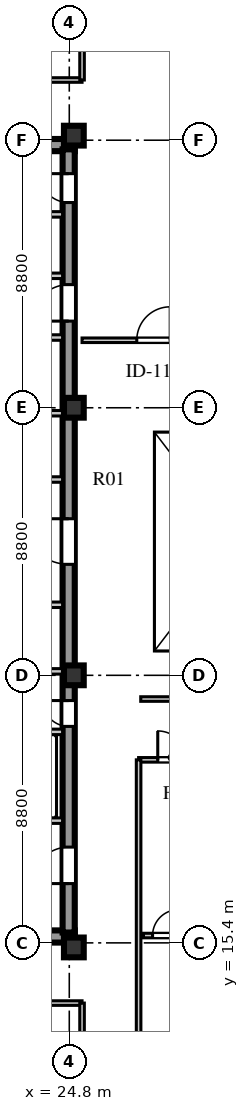
"""IFC4 building model, lengths in metres.
Left out: names, types, materials, properties, quantities, classifications, styles, units other than length and angle.
Written with IfcOpenShell. Run it as: python <this file> out.ifc"""

import sys

from ifc_helpers import new_model, si_unit, direction, frame, frame_2d, origin, origin_2d, place, context, subcontext, project, spatial, rectangle, extrude, element, fill, save


model = new_model("IFC4")
c1 = context("Model", 3, precision=1e-05, world=origin(), true_north=direction((0.0, 1.0)))
c2 = subcontext(c1, "Body", "Model", "MODEL_VIEW")
j1 = project(units=[si_unit("LENGTHUNIT", "METRE"), si_unit("PLANEANGLEUNIT", "RADIAN")], contexts=[c1])
p1 = place(None, origin())
s1 = spatial("IfcSite", under=j1, at=p1, CompositionType="ELEMENT")
p2 = place(p1, origin())
s2 = spatial("IfcBuilding", under=s1, at=p2, CompositionType="ELEMENT")
p3 = place(p2, frame((0.0, 0.0, 312.5)))
s3 = spatial("IfcBuildingStorey", under=s2, at=p3, CompositionType="ELEMENT", Elevation=312.5)
for number, where, z_axis, x_axis in (
    (1, (15.5, 15.61, 0.0), (0.0, 0.0, 1.0), (1.0, 0.0, 0.0)),
    (2, (15.5, 41.64, 0.0), (0.0, 0.0, 1.0), (1.0, 0.0, 0.0)),
):
    element("IfcWall", number, at=place(p3, frame(where, z_axis=z_axis, x_axis=x_axis)), inside=s3, PredefinedType="SHEAR", context=c2, shape_type="SweptSolid", body=[
        extrude(rectangle(XDim=9.48, YDim=0.4, at=frame_2d((4.74, 0.0))), origin(), (0.0, 0.0, 1.0), 3.56),
    ])
p4 = place(p3, frame((24.78, 15.74, 0.0), z_axis=(0.0, 0.0, 1.0), x_axis=(0.0, 1.0, 0.0)))
e3 = element("IfcWall", 3, at=p4, inside=s3, PredefinedType="SHEAR", context=c2, shape_type="SweptSolid", body=[
    extrude(rectangle(XDim=25.76, YDim=0.4, at=frame_2d((12.88, 0.0))), origin(), (0.0, 0.0, 1.0), 3.56),
])
p5 = place(p4, frame((1.61, 0.0, 0.0)))
e4 = element("IfcOpeningElement", 4, at=p5, cuts=e3, PredefinedType="OPENING", context=c2, shape_type="SweptSolid", body=[
    extrude(rectangle(XDim=1.2, YDim=2.1, at=frame_2d((0.6, 1.05))), frame((0.0, 0.21, 0.0), z_axis=(0.0, -1.0, 0.0), x_axis=(1.0, 0.0, 0.0)), (0.0, 0.0, 1.0), 0.42),
])
p6 = place(p4, frame((6.78, 0.0, 0.0)))
e5 = element("IfcOpeningElement", 5, at=p6, cuts=e3, PredefinedType="OPENING", context=c2, shape_type="SweptSolid", body=[
    extrude(rectangle(XDim=0.85, YDim=2.06, at=frame_2d((0.425, 1.03))), frame((0.0, 0.21, 0.0), z_axis=(0.0, -1.0, 0.0), x_axis=(1.0, 0.0, 0.0)), (0.0, 0.0, 1.0), 0.42),
])
p7 = place(p4, frame((12.11, 0.0, 0.0)))
e6 = element("IfcOpeningElement", 6, at=p7, cuts=e3, PredefinedType="OPENING", context=c2, shape_type="SweptSolid", body=[
    extrude(rectangle(XDim=1.5, YDim=2.12, at=frame_2d((0.75, 1.06))), frame((0.0, 0.21, 0.0), z_axis=(0.0, -1.0, 0.0), x_axis=(1.0, 0.0, 0.0)), (0.0, 0.0, 1.0), 0.42),
])
p8 = place(p4, frame((20.11, 0.0, 0.0)))
e7 = element("IfcOpeningElement", 7, at=p8, cuts=e3, PredefinedType="OPENING", context=c2, shape_type="SweptSolid", body=[
    extrude(rectangle(XDim=1.2, YDim=2.12, at=frame_2d((0.6, 1.06))), frame((0.0, 0.21, 0.0), z_axis=(0.0, -1.0, 0.0), x_axis=(1.0, 0.0, 0.0)), (0.0, 0.0, 1.0), 0.42),
])
p9 = place(p4, frame((24.01, 0.0, 0.0)))
e8 = element("IfcOpeningElement", 8, at=p9, cuts=e3, PredefinedType="OPENING", context=c2, shape_type="SweptSolid", body=[
    extrude(rectangle(XDim=0.95, YDim=2.1, at=frame_2d((0.475, 1.05))), frame((0.0, 0.21, 0.0), z_axis=(0.0, -1.0, 0.0), x_axis=(1.0, 0.0, 0.0)), (0.0, 0.0, 1.0), 0.42),
])
for number, where, z_axis, x_axis in (
    (9, (24.95, 15.25, 0.0), (0.0, 0.0, 1.0), (1.0, 0.0, 0.0)),
    (10, (24.95, 24.2, 0.0), (0.0, 0.0, 1.0), (1.0, 0.0, 0.0)),
    (11, (24.95, 33.0, 0.0), (0.0, 0.0, 1.0), (1.0, 0.0, 0.0)),
    (12, (24.95, 41.95, 0.0), (0.0, 0.0, 1.0), (1.0, 0.0, 0.0)),
):
    element("IfcColumn", number, at=place(p3, frame(where, z_axis=z_axis, x_axis=x_axis)), inside=s3, PredefinedType="COLUMN", context=c2, shape_type="SweptSolid", body=[
        extrude(rectangle(XDim=0.65, YDim=0.65, at=origin_2d()), origin(), (0.0, 0.0, 1.0), 3.56),
    ])
p10 = place(p3, frame((19.64, 19.42, 0.0), z_axis=(0.0, 0.0, 1.0), x_axis=(1.0, 0.0, 0.0)))
e13 = element("IfcWall", 13, at=p10, inside=s3, PredefinedType="SOLIDWALL", context=c2, shape_type="SweptSolid", body=[
    extrude(rectangle(XDim=4.94, YDim=0.18, at=frame_2d((2.47, 0.0))), origin(), (0.0, 0.0, 1.0), 3.56),
])
p11 = place(p10, frame((0.72, 0.0, 0.0)))
e14 = element("IfcOpeningElement", 14, at=p11, cuts=e13, PredefinedType="OPENING", context=c2, shape_type="SweptSolid", body=[
    extrude(rectangle(XDim=1.1, YDim=2.1, at=frame_2d((0.55, 1.05))), frame((0.0, 0.1, 0.0), z_axis=(0.0, -1.0, 0.0), x_axis=(1.0, 0.0, 0.0)), (0.0, 0.0, 1.0), 0.2),
])
p12 = place(p10, frame((3.02, 0.0, 0.0)))
e15 = element("IfcOpeningElement", 15, at=p12, cuts=e13, PredefinedType="OPENING", context=c2, shape_type="SweptSolid", body=[
    extrude(rectangle(XDim=1.1, YDim=2.1, at=frame_2d((0.55, 1.05))), frame((0.0, 0.1, 0.0), z_axis=(0.0, -1.0, 0.0), x_axis=(1.0, 0.0, 0.0)), (0.0, 0.0, 1.0), 0.2),
])
p13 = place(p3, frame((19.64, 22.34, 0.0), z_axis=(0.0, 0.0, 1.0), x_axis=(1.0, 0.0, 0.0)))
e16 = element("IfcWall", 16, at=p13, inside=s3, PredefinedType="SOLIDWALL", context=c2, shape_type="SweptSolid", body=[
    extrude(rectangle(XDim=4.94, YDim=0.18, at=frame_2d((2.47, 0.0))), origin(), (0.0, 0.0, 1.0), 3.56),
])
p14 = place(p3, frame((15.9, 26.52, 0.0), z_axis=(0.0, 0.0, 1.0), x_axis=(1.0, 0.0, 0.0)))
e17 = element("IfcWall", 17, at=p14, inside=s3, PredefinedType="SOLIDWALL", context=c2, shape_type="SweptSolid", body=[
    extrude(rectangle(XDim=8.68, YDim=0.18, at=frame_2d((4.34, 0.0))), origin(), (0.0, 0.0, 1.0), 3.56),
])
p15 = place(p14, frame((2.05, 0.0, 0.0)))
e18 = element("IfcOpeningElement", 18, at=p15, cuts=e17, PredefinedType="OPENING", context=c2, shape_type="SweptSolid", body=[
    extrude(rectangle(XDim=0.85, YDim=2.06, at=frame_2d((0.425, 1.03))), frame((0.0, 0.1, 0.0), z_axis=(0.0, -1.0, 0.0), x_axis=(1.0, 0.0, 0.0)), (0.0, 0.0, 1.0), 0.2),
])
p16 = place(p14, frame((5.2, 0.0, 0.0)))
e19 = element("IfcOpeningElement", 19, at=p16, cuts=e17, PredefinedType="OPENING", context=c2, shape_type="SweptSolid", body=[
    extrude(rectangle(XDim=0.95, YDim=2.1, at=frame_2d((0.475, 1.05))), frame((0.0, 0.1, 0.0), z_axis=(0.0, -1.0, 0.0), x_axis=(1.0, 0.0, 0.0)), (0.0, 0.0, 1.0), 0.2),
])
p17 = place(p3, frame((15.9, 24.33, 0.0), z_axis=(0.0, 0.0, 1.0), x_axis=(1.0, 0.0, 0.0)))
e20 = element("IfcWall", 20, at=p17, inside=s3, PredefinedType="SOLIDWALL", context=c2, shape_type="SweptSolid", body=[
    extrude(rectangle(XDim=8.68, YDim=0.18, at=frame_2d((4.34, 0.0))), origin(), (0.0, 0.0, 1.0), 2.96),
])
p18 = place(p3, frame((15.9, 30.64, 0.0), z_axis=(0.0, 0.0, 1.0), x_axis=(1.0, 0.0, 0.0)))
e21 = element("IfcWall", 21, at=p18, inside=s3, PredefinedType="SOLIDWALL", context=c2, shape_type="SweptSolid", body=[
    extrude(rectangle(XDim=8.68, YDim=0.18, at=frame_2d((4.34, 0.0))), origin(), (0.0, 0.0, 1.0), 3.56),
])
p19 = place(p18, frame((3.7, 0.0, 0.0)))
e22 = element("IfcOpeningElement", 22, at=p19, cuts=e21, PredefinedType="OPENING", context=c2, shape_type="SweptSolid", body=[
    extrude(rectangle(XDim=0.95, YDim=2.1, at=frame_2d((0.475, 1.05))), frame((0.0, 0.1, 0.0), z_axis=(0.0, -1.0, 0.0), x_axis=(1.0, 0.0, 0.0)), (0.0, 0.0, 1.0), 0.2),
])
p20 = place(p3, frame((15.9, 32.82, 0.0), z_axis=(0.0, 0.0, 1.0), x_axis=(1.0, 0.0, 0.0)))
e23 = element("IfcWall", 23, at=p20, inside=s3, PredefinedType="SOLIDWALL", context=c2, shape_type="SweptSolid", body=[
    extrude(rectangle(XDim=8.68, YDim=0.18, at=frame_2d((4.34, 0.0))), origin(), (0.0, 0.0, 1.0), 2.96),
])
p21 = place(p3, frame((22.02, 35.31, 0.0), z_axis=(0.0, 0.0, 1.0), x_axis=(1.0, 0.0, 0.0)))
e24 = element("IfcWall", 24, at=p21, inside=s3, PredefinedType="SOLIDWALL", context=c2, shape_type="SweptSolid", body=[
    extrude(rectangle(XDim=2.56, YDim=0.18, at=frame_2d((1.28, 0.0))), origin(), (0.0, 0.0, 1.0), 3.56),
])
p22 = place(p21, frame((0.55, 0.0, 0.0)))
e25 = element("IfcOpeningElement", 25, at=p22, cuts=e24, PredefinedType="OPENING", context=c2, shape_type="SweptSolid", body=[
    extrude(rectangle(XDim=1.0, YDim=2.1, at=frame_2d((0.5, 1.05))), frame((0.0, 0.1, 0.0), z_axis=(0.0, -1.0, 0.0), x_axis=(1.0, 0.0, 0.0)), (0.0, 0.0, 1.0), 0.2),
])
p23 = place(p3, frame((19.64, 37.34, 0.0), z_axis=(0.0, 0.0, 1.0), x_axis=(1.0, 0.0, 0.0)))
e26 = element("IfcWall", 26, at=p23, inside=s3, PredefinedType="SOLIDWALL", context=c2, shape_type="SweptSolid", body=[
    extrude(rectangle(XDim=4.94, YDim=0.18, at=frame_2d((2.47, 0.0))), origin(), (0.0, 0.0, 1.0), 3.56),
])
p24 = place(p23, frame((0.45, 0.0, 0.0)))
e27 = element("IfcOpeningElement", 27, at=p24, cuts=e26, PredefinedType="OPENING", context=c2, shape_type="SweptSolid", body=[
    extrude(rectangle(XDim=1.0, YDim=2.1, at=frame_2d((0.5, 1.05))), frame((0.0, 0.1, 0.0), z_axis=(0.0, -1.0, 0.0), x_axis=(1.0, 0.0, 0.0)), (0.0, 0.0, 1.0), 0.2),
])
p25 = place(p23, frame((2.5, 0.0, 0.0)))
e28 = element("IfcOpeningElement", 28, at=p25, cuts=e26, PredefinedType="OPENING", context=c2, shape_type="SweptSolid", body=[
    extrude(rectangle(XDim=1.0, YDim=2.1, at=frame_2d((0.5, 1.05))), frame((0.0, 0.1, 0.0), z_axis=(0.0, -1.0, 0.0), x_axis=(1.0, 0.0, 0.0)), (0.0, 0.0, 1.0), 0.2),
])
p26 = place(p3, frame((19.64, 39.36, 0.0), z_axis=(0.0, 0.0, 1.0), x_axis=(1.0, 0.0, 0.0)))
e29 = element("IfcWall", 29, at=p26, inside=s3, PredefinedType="SOLIDWALL", context=c2, shape_type="SweptSolid", body=[
    extrude(rectangle(XDim=4.94, YDim=0.18, at=frame_2d((2.47, 0.0))), origin(), (0.0, 0.0, 1.0), 3.56),
])
p27 = place(p3, frame((27.08, 21.42, 0.0), z_axis=(0.0, 0.0, 1.0), x_axis=(1.0, 0.0, 0.0)))
e30 = element("IfcWall", 30, at=p27, inside=s3, PredefinedType="PARTITIONING", context=c2, shape_type="SweptSolid", body=[
    extrude(rectangle(XDim=12.07, YDim=0.15, at=frame_2d((6.035, 0.0))), origin(), (0.0, 0.0, 1.0), 3.26),
])
p28 = place(p27, frame((0.63, 0.0, 0.0)))
e31 = element("IfcOpeningElement", 31, at=p28, cuts=e30, PredefinedType="OPENING", context=c2, shape_type="SweptSolid", body=[
    extrude(rectangle(XDim=0.95, YDim=2.1, at=frame_2d((0.475, 1.05))), frame((0.0, 0.085, 0.0), z_axis=(0.0, -1.0, 0.0), x_axis=(1.0, 0.0, 0.0)), (0.0, 0.0, 1.0), 0.17),
])
p29 = place(p3, frame((27.08, 10.38, 0.0), z_axis=(0.0, 0.0, 1.0), x_axis=(0.0, 1.0, 0.0)))
e32 = element("IfcWall", 32, at=p29, inside=s3, PredefinedType="PARTITIONING", context=c2, shape_type="SweptSolid", body=[
    extrude(rectangle(XDim=11.04, YDim=0.15, at=frame_2d((5.52, 0.0))), origin(), (0.0, 0.0, 1.0), 3.56),
])
p30 = place(p3, frame((27.15, 23.42, 0.0), z_axis=(0.0, 0.0, 1.0), x_axis=(1.0, 0.0, 0.0)))
e33 = element("IfcWall", 33, at=p30, inside=s3, PredefinedType="PARTITIONING", context=c2, shape_type="SweptSolid", body=[
    extrude(rectangle(XDim=6.0, YDim=0.15, at=frame_2d((3.0, 0.0))), origin(), (0.0, 0.0, 1.0), 3.56),
])
p31 = place(p3, frame((25.22, 35.22, 0.0), z_axis=(0.0, 0.0, 1.0), x_axis=(1.0, 0.0, 0.0)))
e34 = element("IfcWall", 34, at=p31, inside=s3, PredefinedType="PARTITIONING", context=c2, shape_type="SweptSolid", body=[
    extrude(rectangle(XDim=9.5, YDim=0.15, at=frame_2d((4.75, 0.0))), origin(), (0.0, 0.0, 1.0), 3.56),
])
p32 = place(p31, frame((1.8, 0.0, 0.0)))
e35 = element("IfcOpeningElement", 35, at=p32, cuts=e34, PredefinedType="OPENING", context=c2, shape_type="SweptSolid", body=[
    extrude(rectangle(XDim=1.1, YDim=2.08, at=frame_2d((0.55, 1.04))), frame((0.0, 0.085, 0.0), z_axis=(0.0, -1.0, 0.0), x_axis=(1.0, 0.0, 0.0)), (0.0, 0.0, 1.0), 0.17),
])
p33 = place(p3, frame((13.8, 13.42, 0.0), z_axis=(0.0, 0.0, 1.0), x_axis=(1.0, 0.0, 0.0)))
e36 = element("IfcWall", 36, at=p33, inside=s3, PredefinedType="PARTITIONING", context=c2, shape_type="SweptSolid", body=[
    extrude(rectangle(XDim=11.42, YDim=0.15, at=frame_2d((5.71, 0.0))), origin(), (0.0, 0.0, 1.0), 3.56),
])
p34 = place(p33, frame((3.2, 0.0, 0.0)))
e37 = element("IfcOpeningElement", 37, at=p34, cuts=e36, PredefinedType="OPENING", context=c2, shape_type="SweptSolid", body=[
    extrude(rectangle(XDim=0.95, YDim=2.08, at=frame_2d((0.475, 1.04))), frame((0.0, 0.085, 0.0), z_axis=(0.0, -1.0, 0.0), x_axis=(1.0, 0.0, 0.0)), (0.0, 0.0, 1.0), 0.17),
])
p35 = place(p3, frame((25.22, 10.38, 0.0), z_axis=(0.0, 0.0, 1.0), x_axis=(0.0, 1.0, 0.0)))
e38 = element("IfcWall", 38, at=p35, inside=s3, PredefinedType="PARTITIONING", context=c2, shape_type="SweptSolid", body=[
    extrude(rectangle(XDim=3.04, YDim=0.15, at=frame_2d((1.52, 0.0))), origin(), (0.0, 0.0, 1.0), 3.11),
])
p36 = place(p3, frame((13.8, 43.78, 0.0), z_axis=(0.0, 0.0, 1.0), x_axis=(1.0, 0.0, 0.0)))
e39 = element("IfcWall", 39, at=p36, inside=s3, PredefinedType="PARTITIONING", context=c2, shape_type="SweptSolid", body=[
    extrude(rectangle(XDim=11.42, YDim=0.15, at=frame_2d((5.71, 0.0))), origin(), (0.0, 0.0, 1.0), 3.56),
])
p37 = place(p36, frame((3.2, 0.0, 0.0)))
e40 = element("IfcOpeningElement", 40, at=p37, cuts=e39, PredefinedType="OPENING", context=c2, shape_type="SweptSolid", body=[
    extrude(rectangle(XDim=0.95, YDim=2.08, at=frame_2d((0.475, 1.04))), frame((0.0, 0.085, 0.0), z_axis=(0.0, -1.0, 0.0), x_axis=(1.0, 0.0, 0.0)), (0.0, 0.0, 1.0), 0.17),
])
p38 = place(p3, frame((25.22, 43.78, 0.0), z_axis=(0.0, 0.0, 1.0), x_axis=(0.0, 1.0, 0.0)))
e41 = element("IfcWall", 41, at=p38, inside=s3, PredefinedType="PARTITIONING", context=c2, shape_type="SweptSolid", body=[
    extrude(rectangle(XDim=3.04, YDim=0.15, at=frame_2d((1.52, 0.0))), origin(), (0.0, 0.0, 1.0), 3.11),
])
p39 = place(p3, frame((27.24, 15.641, 0.0), z_axis=(0.0, 0.0, 1.0), x_axis=(1.0, 0.0, 0.0)))
e42 = element("IfcWall", 42, at=p39, inside=s3, PredefinedType="PARTITIONING", context=c2, shape_type="SweptSolid", body=[
    extrude(rectangle(XDim=11.83, YDim=0.15, at=frame_2d((5.915, 0.0))), origin(), (0.0, 0.0, 1.0), 3.56),
])
p40 = place(p39, frame((0.3, 0.0, 0.0)))
e43 = element("IfcOpeningElement", 43, at=p40, cuts=e42, PredefinedType="OPENING", context=c2, shape_type="SweptSolid", body=[
    extrude(rectangle(XDim=0.85, YDim=2.08, at=frame_2d((0.425, 1.04))), frame((0.0, 0.085, 0.0), z_axis=(0.0, -1.0, 0.0), x_axis=(1.0, 0.0, 0.0)), (0.0, 0.0, 1.0), 0.17),
])
p41 = place(p39, frame((4.475, 0.0, 0.0)))
e44 = element("IfcOpeningElement", 44, at=p41, cuts=e42, PredefinedType="OPENING", context=c2, shape_type="SweptSolid", body=[
    extrude(rectangle(XDim=0.85, YDim=2.08, at=frame_2d((0.425, 1.04))), frame((0.0, 0.085, 0.0), z_axis=(0.0, -1.0, 0.0), x_axis=(1.0, 0.0, 0.0)), (0.0, 0.0, 1.0), 0.17),
])
p42 = place(p5, frame((1.2, 0.0, 0.0), z_axis=(0.0, 0.0, 1.0), x_axis=(-1.0, 0.0, 0.0)))
e45 = element("IfcDoor", 45, at=p42, inside=s3, OperationType="SINGLE_SWING_RIGHT", PredefinedType="DOOR", context=c2, shape_type="SweptSolid", body=[
    extrude(rectangle(XDim=1.2, YDim=2.1, at=frame_2d((0.6, 1.05))), frame((0.0, 0.025, 0.0), z_axis=(0.0, -1.0, 0.0), x_axis=(1.0, 0.0, 0.0)), (0.0, 0.0, 1.0), 0.05),
])
fill(e4, e45)
p43 = place(p6, frame((0.85, 0.0, 0.0), z_axis=(0.0, 0.0, 1.0), x_axis=(-1.0, 0.0, 0.0)))
e46 = element("IfcDoor", 46, at=p43, inside=s3, OperationType="SINGLE_SWING_LEFT", PredefinedType="DOOR", context=c2, shape_type="SweptSolid", body=[
    extrude(rectangle(XDim=0.85, YDim=2.06, at=frame_2d((0.425, 1.03))), frame((0.0, 0.025, 0.0), z_axis=(0.0, -1.0, 0.0), x_axis=(1.0, 0.0, 0.0)), (0.0, 0.0, 1.0), 0.05),
])
fill(e5, e46)
p44 = place(p7, frame((1.5, 0.0, 0.0), z_axis=(0.0, 0.0, 1.0), x_axis=(-1.0, 0.0, 0.0)))
e47 = element("IfcDoor", 47, at=p44, inside=s3, OperationType="SINGLE_SWING_LEFT", PredefinedType="DOOR", context=c2, shape_type="SweptSolid", body=[
    extrude(rectangle(XDim=1.5, YDim=2.12, at=frame_2d((0.75, 1.06))), frame((0.0, 0.025, 0.0), z_axis=(0.0, -1.0, 0.0), x_axis=(1.0, 0.0, 0.0)), (0.0, 0.0, 1.0), 0.05),
])
fill(e6, e47)
p45 = place(p8, frame((1.2, 0.0, 0.0), z_axis=(0.0, 0.0, 1.0), x_axis=(-1.0, 0.0, 0.0)))
e48 = element("IfcDoor", 48, at=p45, inside=s3, OperationType="SINGLE_SWING_RIGHT", PredefinedType="DOOR", context=c2, shape_type="SweptSolid", body=[
    extrude(rectangle(XDim=1.2, YDim=2.12, at=frame_2d((0.6, 1.06))), frame((0.0, 0.025, 0.0), z_axis=(0.0, -1.0, 0.0), x_axis=(1.0, 0.0, 0.0)), (0.0, 0.0, 1.0), 0.05),
])
fill(e7, e48)
p46 = place(p9, frame((0.95, 0.0, 0.0), z_axis=(0.0, 0.0, 1.0), x_axis=(-1.0, 0.0, 0.0)))
e49 = element("IfcDoor", 49, at=p46, inside=s3, OperationType="SINGLE_SWING_LEFT", PredefinedType="DOOR", context=c2, shape_type="SweptSolid", body=[
    extrude(rectangle(XDim=0.95, YDim=2.1, at=frame_2d((0.475, 1.05))), frame((0.0, 0.025, 0.0), z_axis=(0.0, -1.0, 0.0), x_axis=(1.0, 0.0, 0.0)), (0.0, 0.0, 1.0), 0.05),
])
fill(e8, e49)
p47 = place(p40, frame((0.85, 0.0, 0.0), z_axis=(0.0, 0.0, 1.0), x_axis=(-1.0, 0.0, 0.0)))
e50 = element("IfcDoor", 50, at=p47, inside=s3, OperationType="SINGLE_SWING_LEFT", PredefinedType="DOOR", context=c2, shape_type="SweptSolid", body=[
    extrude(rectangle(XDim=0.85, YDim=2.08, at=frame_2d((0.425, 1.04))), frame((0.0, 0.025, 0.0), z_axis=(0.0, -1.0, 0.0), x_axis=(1.0, 0.0, 0.0)), (0.0, 0.0, 1.0), 0.05),
])
fill(e43, e50)
p48 = place(p28, frame((0.95, 0.0, 0.0), z_axis=(0.0, 0.0, 1.0), x_axis=(-1.0, 0.0, 0.0)))
e51 = element("IfcDoor", 51, at=p48, inside=s3, OperationType="SINGLE_SWING_RIGHT", PredefinedType="DOOR", context=c2, shape_type="SweptSolid", body=[
    extrude(rectangle(XDim=0.95, YDim=2.1, at=frame_2d((0.475, 1.05))), frame((0.0, 0.025, 0.0), z_axis=(0.0, -1.0, 0.0), x_axis=(1.0, 0.0, 0.0)), (0.0, 0.0, 1.0), 0.05),
])
fill(e31, e51)
p49 = place(p32, origin())
e52 = element("IfcDoor", 52, at=p49, inside=s3, OperationType="SINGLE_SWING_RIGHT", PredefinedType="DOOR", context=c2, shape_type="SweptSolid", body=[
    extrude(rectangle(XDim=1.1, YDim=2.08, at=frame_2d((0.55, 1.04))), frame((0.0, 0.025, 0.0), z_axis=(0.0, -1.0, 0.0), x_axis=(1.0, 0.0, 0.0)), (0.0, 0.0, 1.0), 0.05),
])
fill(e35, e52)
save(model, sys.argv[1])
